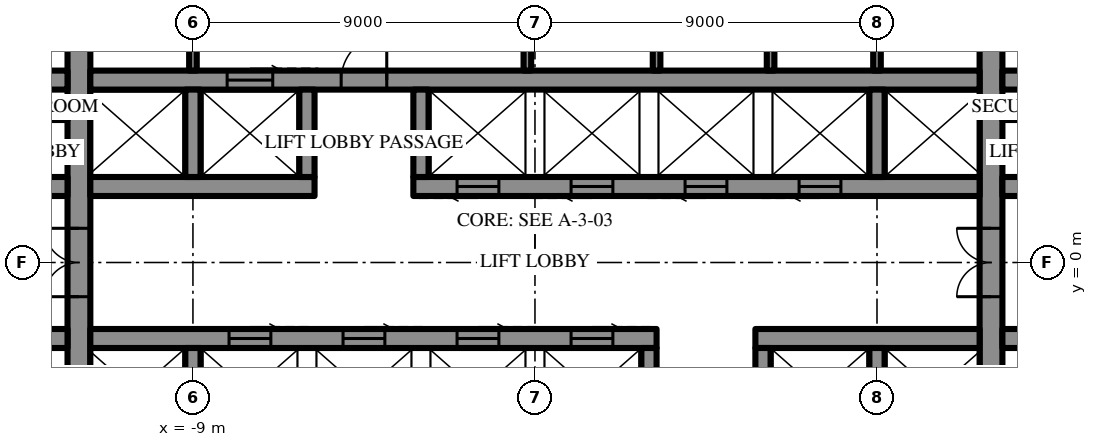
"""IFC4 building model, lengths in metres.
Left out: names, types, materials, properties, quantities, classifications, styles, units other than length and angle.
Written with IfcOpenShell. Run it as: python <this file> out.ifc"""

import sys

from ifc_helpers import new_model, si_unit, direction, frame, frame_2d, origin, place, context, subcontext, project, spatial, rectangle, extrude, element, fill, save


model = new_model("IFC4")
c1 = context("Model", 3, precision=1e-05, world=origin(), true_north=direction((0.0, 1.0)))
c2 = subcontext(c1, "Body", "Model", "MODEL_VIEW")
j1 = project(units=[si_unit("LENGTHUNIT", "METRE"), si_unit("PLANEANGLEUNIT", "RADIAN")], contexts=[c1])
p1 = place(None, origin())
s1 = spatial("IfcSite", under=j1, at=p1, CompositionType="ELEMENT")
p2 = place(p1, origin())
s2 = spatial("IfcBuilding", under=s1, at=p2, CompositionType="ELEMENT")
p3 = place(p2, frame((0.0, 0.0, 244.9)))
s3 = spatial("IfcBuildingStorey", under=s2, at=p3, CompositionType="ELEMENT", Elevation=244.9)
p4 = place(p3, frame((12.0, -10.7, 0.0), z_axis=(0.0, 0.0, 1.0), x_axis=(0.0, 1.0, 0.0)))
e1 = element("IfcWall", 1, at=p4, inside=s3, PredefinedType="SHEAR", context=c2, shape_type="SweptSolid", body=[
    extrude(rectangle(XDim=21.4, YDim=0.6, at=frame_2d((10.7, 0.0))), origin(), (0.0, 0.0, 1.0), 4.2),
])
p5 = place(p4, frame((9.8, 0.0, 0.0)))
e2 = element("IfcOpeningElement", 2, at=p5, cuts=e1, PredefinedType="OPENING", context=c2, shape_type="SweptSolid", body=[
    extrude(rectangle(XDim=1.8, YDim=2.4, at=frame_2d((0.9, 1.2))), frame((0.0, 0.31, 0.0), z_axis=(0.0, -1.0, 0.0), x_axis=(1.0, 0.0, 0.0)), (0.0, 0.0, 1.0), 0.62),
])
p6 = place(p3, frame((-12.0, -10.7, 0.0), z_axis=(0.0, 0.0, 1.0), x_axis=(0.0, 1.0, 0.0)))
e3 = element("IfcWall", 3, at=p6, inside=s3, PredefinedType="SHEAR", context=c2, shape_type="SweptSolid", body=[
    extrude(rectangle(XDim=21.4, YDim=0.6, at=frame_2d((10.7, 0.0))), origin(), (0.0, 0.0, 1.0), 4.2),
])
p7 = place(p6, frame((9.8, 0.0, 0.0)))
e4 = element("IfcOpeningElement", 4, at=p7, cuts=e3, PredefinedType="OPENING", context=c2, shape_type="SweptSolid", body=[
    extrude(rectangle(XDim=1.8, YDim=2.4, at=frame_2d((0.9, 1.2))), frame((0.0, 0.31, 0.0), z_axis=(0.0, -1.0, 0.0), x_axis=(1.0, 0.0, 0.0)), (0.0, 0.0, 1.0), 0.62),
])
p8 = place(p3, frame((-14.5, 2.0, 0.0), z_axis=(0.0, 0.0, 1.0), x_axis=(1.0, 0.0, 0.0)))
e5 = element("IfcWall", 5, at=p8, inside=s3, PredefinedType="SHEAR", context=c2, shape_type="SweptSolid", body=[
    extrude(rectangle(XDim=2.2, YDim=0.5, at=frame_2d((1.1, 0.0))), origin(), (0.0, 0.0, 1.0), 4.2),
])
p9 = place(p8, frame((0.5, 0.0, 0.0)))
e6 = element("IfcOpeningElement", 6, at=p9, cuts=e5, PredefinedType="OPENING", context=c2, shape_type="SweptSolid", body=[
    extrude(rectangle(XDim=0.9, YDim=2.2, at=frame_2d((0.45, 1.1))), frame((0.0, 0.26, 0.0), z_axis=(0.0, -1.0, 0.0), x_axis=(1.0, 0.0, 0.0)), (0.0, 0.0, 1.0), 0.52),
])
p10 = place(p3, frame((-11.7, 2.0, 0.0), z_axis=(0.0, 0.0, 1.0), x_axis=(1.0, 0.0, 0.0)))
e7 = element("IfcWall", 7, at=p10, inside=s3, PredefinedType="SHEAR", context=c2, shape_type="SweptSolid", body=[
    extrude(rectangle(XDim=5.9, YDim=0.5, at=frame_2d((2.95, 0.0))), origin(), (0.0, 0.0, 1.0), 4.2),
])
p11 = place(p3, frame((-3.2, 2.0, 0.0), z_axis=(0.0, 0.0, 1.0), x_axis=(1.0, 0.0, 0.0)))
e8 = element("IfcWall", 8, at=p11, inside=s3, PredefinedType="SHEAR", context=c2, shape_type="SweptSolid", body=[
    extrude(rectangle(XDim=14.9, YDim=0.5, at=frame_2d((7.45, 0.0))), origin(), (0.0, 0.0, 1.0), 4.2),
])
p12 = place(p11, frame((1.15, 0.0, 0.0)))
e9 = element("IfcOpeningElement", 9, at=p12, cuts=e8, PredefinedType="OPENING", context=c2, shape_type="SweptSolid", body=[
    extrude(rectangle(XDim=1.1, YDim=2.2, at=frame_2d((0.55, 1.1))), frame((0.0, 0.26, 0.0), z_axis=(0.0, -1.0, 0.0), x_axis=(1.0, 0.0, 0.0)), (0.0, 0.0, 1.0), 0.52),
])
p13 = place(p11, frame((4.15, 0.0, 0.0)))
e10 = element("IfcOpeningElement", 10, at=p13, cuts=e8, PredefinedType="OPENING", context=c2, shape_type="SweptSolid", body=[
    extrude(rectangle(XDim=1.1, YDim=2.2, at=frame_2d((0.55, 1.1))), frame((0.0, 0.26, 0.0), z_axis=(0.0, -1.0, 0.0), x_axis=(1.0, 0.0, 0.0)), (0.0, 0.0, 1.0), 0.52),
])
p14 = place(p11, frame((7.15, 0.0, 0.0)))
e11 = element("IfcOpeningElement", 11, at=p14, cuts=e8, PredefinedType="OPENING", context=c2, shape_type="SweptSolid", body=[
    extrude(rectangle(XDim=1.1, YDim=2.2, at=frame_2d((0.55, 1.1))), frame((0.0, 0.26, 0.0), z_axis=(0.0, -1.0, 0.0), x_axis=(1.0, 0.0, 0.0)), (0.0, 0.0, 1.0), 0.52),
])
p15 = place(p11, frame((10.15, 0.0, 0.0)))
e12 = element("IfcOpeningElement", 12, at=p15, cuts=e8, PredefinedType="OPENING", context=c2, shape_type="SweptSolid", body=[
    extrude(rectangle(XDim=1.1, YDim=2.2, at=frame_2d((0.55, 1.1))), frame((0.0, 0.26, 0.0), z_axis=(0.0, -1.0, 0.0), x_axis=(1.0, 0.0, 0.0)), (0.0, 0.0, 1.0), 0.52),
])
p16 = place(p3, frame((12.3, 2.0, 0.0), z_axis=(0.0, 0.0, 1.0), x_axis=(1.0, 0.0, 0.0)))
e13 = element("IfcWall", 13, at=p16, inside=s3, PredefinedType="SHEAR", context=c2, shape_type="SweptSolid", body=[
    extrude(rectangle(XDim=2.2, YDim=0.5, at=frame_2d((1.1, 0.0))), origin(), (0.0, 0.0, 1.0), 4.2),
])
p17 = place(p16, frame((0.8, 0.0, 0.0)))
e14 = element("IfcOpeningElement", 14, at=p17, cuts=e13, PredefinedType="OPENING", context=c2, shape_type="SweptSolid", body=[
    extrude(rectangle(XDim=0.9, YDim=2.2, at=frame_2d((0.45, 1.1))), frame((0.0, 0.26, 0.0), z_axis=(0.0, -1.0, 0.0), x_axis=(1.0, 0.0, 0.0)), (0.0, 0.0, 1.0), 0.52),
])
p18 = place(p3, frame((-14.5, 4.8, 0.0), z_axis=(0.0, 0.0, 1.0), x_axis=(1.0, 0.0, 0.0)))
e15 = element("IfcWall", 15, at=p18, inside=s3, PredefinedType="SHEAR", context=c2, shape_type="SweptSolid", body=[
    extrude(rectangle(XDim=2.2, YDim=0.5, at=frame_2d((1.1, 0.0))), origin(), (0.0, 0.0, 1.0), 4.2),
])
p19 = place(p3, frame((-11.7, 4.8, 0.0), z_axis=(0.0, 0.0, 1.0), x_axis=(1.0, 0.0, 0.0)))
e16 = element("IfcWall", 16, at=p19, inside=s3, PredefinedType="SHEAR", context=c2, shape_type="SweptSolid", body=[
    extrude(rectangle(XDim=23.4, YDim=0.5, at=frame_2d((11.7, 0.0))), origin(), (0.0, 0.0, 1.0), 4.2),
])
p20 = place(p19, frame((6.6, 0.0, 0.0)))
e17 = element("IfcOpeningElement", 17, at=p20, cuts=e16, PredefinedType="OPENING", context=c2, shape_type="SweptSolid", body=[
    extrude(rectangle(XDim=1.2, YDim=2.2, at=frame_2d((0.6, 1.1))), frame((0.0, 0.26, 0.0), z_axis=(0.0, -1.0, 0.0), x_axis=(1.0, 0.0, 0.0)), (0.0, 0.0, 1.0), 0.52),
])
p21 = place(p19, frame((3.6, 0.0, 0.0)))
e18 = element("IfcOpeningElement", 18, at=p21, cuts=e16, PredefinedType="OPENING", context=c2, shape_type="SweptSolid", body=[
    extrude(rectangle(XDim=1.2, YDim=2.2, at=frame_2d((0.6, 1.1))), frame((0.0, 0.26, 0.0), z_axis=(0.0, -1.0, 0.0), x_axis=(1.0, 0.0, 0.0)), (0.0, 0.0, 1.0), 0.52),
])
p22 = place(p3, frame((12.3, 4.8, 0.0), z_axis=(0.0, 0.0, 1.0), x_axis=(1.0, 0.0, 0.0)))
e19 = element("IfcWall", 19, at=p22, inside=s3, PredefinedType="SHEAR", context=c2, shape_type="SweptSolid", body=[
    extrude(rectangle(XDim=2.2, YDim=0.5, at=frame_2d((1.1, 0.0))), origin(), (0.0, 0.0, 1.0), 4.2),
])
for number, where, z_axis, x_axis in (
    (20, (-9.0, 2.25, 0.0), (0.0, 0.0, 1.0), (0.0, 1.0, 0.0)),
    (21, (-6.0, 2.25, 0.0), (0.0, 0.0, 1.0), (0.0, 1.0, 0.0)),
    (22, (-3.0, 2.25, 0.0), (0.0, 0.0, 1.0), (0.0, 1.0, 0.0)),
    (23, (9.0, 2.25, 0.0), (0.0, 0.0, 1.0), (0.0, 1.0, 0.0)),
):
    element("IfcWall", number, at=place(p3, frame(where, z_axis=z_axis, x_axis=x_axis)), inside=s3, PredefinedType="SHEAR", context=c2, shape_type="SweptSolid", body=[
        extrude(rectangle(XDim=2.3, YDim=0.4, at=frame_2d((1.15, 0.0))), origin(), (0.0, 0.0, 1.0), 4.2),
    ])
p23 = place(p3, frame((-0.2, 5.05, 0.0), z_axis=(0.0, 0.0, 1.0), x_axis=(0.0, 1.0, 0.0)))
e24 = element("IfcWall", 24, at=p23, inside=s3, PredefinedType="SHEAR", context=c2, shape_type="SweptSolid", body=[
    extrude(rectangle(XDim=5.65, YDim=0.2, at=frame_2d((2.825, 0.0))), origin(), (0.0, 0.0, 1.0), 4.2),
])
p24 = place(p3, frame((14.5, -2.0, 0.0), z_axis=(0.0, 0.0, 1.0), x_axis=(-1.0, 0.0, 0.0)))
e25 = element("IfcWall", 25, at=p24, inside=s3, PredefinedType="SHEAR", context=c2, shape_type="SweptSolid", body=[
    extrude(rectangle(XDim=2.2, YDim=0.5, at=frame_2d((1.1, 0.0))), origin(), (0.0, 0.0, 1.0), 4.2),
])
p25 = place(p24, frame((0.5, 0.0, 0.0)))
e26 = element("IfcOpeningElement", 26, at=p25, cuts=e25, PredefinedType="OPENING", context=c2, shape_type="SweptSolid", body=[
    extrude(rectangle(XDim=0.9, YDim=2.2, at=frame_2d((0.45, 1.1))), frame((0.0, 0.26, 0.0), z_axis=(0.0, -1.0, 0.0), x_axis=(1.0, 0.0, 0.0)), (0.0, 0.0, 1.0), 0.52),
])
p26 = place(p3, frame((11.7, -2.0, 0.0), z_axis=(0.0, 0.0, 1.0), x_axis=(-1.0, 0.0, 0.0)))
e27 = element("IfcWall", 27, at=p26, inside=s3, PredefinedType="SHEAR", context=c2, shape_type="SweptSolid", body=[
    extrude(rectangle(XDim=5.9, YDim=0.5, at=frame_2d((2.95, 0.0))), origin(), (0.0, 0.0, 1.0), 4.2),
])
p27 = place(p3, frame((3.2, -2.0, 0.0), z_axis=(0.0, 0.0, 1.0), x_axis=(-1.0, 0.0, 0.0)))
e28 = element("IfcWall", 28, at=p27, inside=s3, PredefinedType="SHEAR", context=c2, shape_type="SweptSolid", body=[
    extrude(rectangle(XDim=14.9, YDim=0.5, at=frame_2d((7.45, 0.0))), origin(), (0.0, 0.0, 1.0), 4.2),
])
p28 = place(p27, frame((1.15, 0.0, 0.0)))
e29 = element("IfcOpeningElement", 29, at=p28, cuts=e28, PredefinedType="OPENING", context=c2, shape_type="SweptSolid", body=[
    extrude(rectangle(XDim=1.1, YDim=2.2, at=frame_2d((0.55, 1.1))), frame((0.0, 0.26, 0.0), z_axis=(0.0, -1.0, 0.0), x_axis=(1.0, 0.0, 0.0)), (0.0, 0.0, 1.0), 0.52),
])
p29 = place(p27, frame((4.15, 0.0, 0.0)))
e30 = element("IfcOpeningElement", 30, at=p29, cuts=e28, PredefinedType="OPENING", context=c2, shape_type="SweptSolid", body=[
    extrude(rectangle(XDim=1.1, YDim=2.2, at=frame_2d((0.55, 1.1))), frame((0.0, 0.26, 0.0), z_axis=(0.0, -1.0, 0.0), x_axis=(1.0, 0.0, 0.0)), (0.0, 0.0, 1.0), 0.52),
])
p30 = place(p27, frame((7.15, 0.0, 0.0)))
e31 = element("IfcOpeningElement", 31, at=p30, cuts=e28, PredefinedType="OPENING", context=c2, shape_type="SweptSolid", body=[
    extrude(rectangle(XDim=1.1, YDim=2.2, at=frame_2d((0.55, 1.1))), frame((0.0, 0.26, 0.0), z_axis=(0.0, -1.0, 0.0), x_axis=(1.0, 0.0, 0.0)), (0.0, 0.0, 1.0), 0.52),
])
p31 = place(p27, frame((10.15, 0.0, 0.0)))
e32 = element("IfcOpeningElement", 32, at=p31, cuts=e28, PredefinedType="OPENING", context=c2, shape_type="SweptSolid", body=[
    extrude(rectangle(XDim=1.1, YDim=2.2, at=frame_2d((0.55, 1.1))), frame((0.0, 0.26, 0.0), z_axis=(0.0, -1.0, 0.0), x_axis=(1.0, 0.0, 0.0)), (0.0, 0.0, 1.0), 0.52),
])
p32 = place(p3, frame((-12.3, -2.0, 0.0), z_axis=(0.0, 0.0, 1.0), x_axis=(-1.0, 0.0, 0.0)))
e33 = element("IfcWall", 33, at=p32, inside=s3, PredefinedType="SHEAR", context=c2, shape_type="SweptSolid", body=[
    extrude(rectangle(XDim=2.2, YDim=0.5, at=frame_2d((1.1, 0.0))), origin(), (0.0, 0.0, 1.0), 4.2),
])
p33 = place(p32, frame((0.8, 0.0, 0.0)))
e34 = element("IfcOpeningElement", 34, at=p33, cuts=e33, PredefinedType="OPENING", context=c2, shape_type="SweptSolid", body=[
    extrude(rectangle(XDim=0.9, YDim=2.2, at=frame_2d((0.45, 1.1))), frame((0.0, 0.26, 0.0), z_axis=(0.0, -1.0, 0.0), x_axis=(1.0, 0.0, 0.0)), (0.0, 0.0, 1.0), 0.52),
])
for number, where, z_axis, x_axis in (
    (35, (9.0, -2.25, 0.0), (0.0, 0.0, 1.0), (0.0, -1.0, 0.0)),
    (36, (6.0, -2.25, 0.0), (0.0, 0.0, 1.0), (0.0, -1.0, 0.0)),
    (37, (3.0, -2.25, 0.0), (0.0, 0.0, 1.0), (0.0, -1.0, 0.0)),
    (38, (-9.0, -2.25, 0.0), (0.0, 0.0, 1.0), (0.0, -1.0, 0.0)),
):
    element("IfcWall", number, at=place(p3, frame(where, z_axis=z_axis, x_axis=x_axis)), inside=s3, PredefinedType="SHEAR", context=c2, shape_type="SweptSolid", body=[
        extrude(rectangle(XDim=2.3, YDim=0.4, at=frame_2d((1.15, 0.0))), origin(), (0.0, 0.0, 1.0), 4.2),
    ])
for number, where, z_axis, x_axis in (
    (39, (-9.0, 5.05, 0.0), (0.0, 0.0, 1.0), (0.0, 1.0, 0.0)),
    (40, (9.0, 5.05, 0.0), (0.0, 0.0, 1.0), (0.0, 1.0, 0.0)),
    (41, (3.2, 5.05, 0.0), (0.0, 0.0, 1.0), (0.0, 1.0, 0.0)),
    (42, (6.2, 5.05, 0.0), (0.0, 0.0, 1.0), (0.0, 1.0, 0.0)),
):
    element("IfcWall", number, at=place(p3, frame(where, z_axis=z_axis, x_axis=x_axis)), inside=s3, PredefinedType="PARTITIONING", context=c2, shape_type="SweptSolid", body=[
        extrude(rectangle(XDim=5.65, YDim=0.2, at=frame_2d((2.825, 0.0))), origin(), (0.0, 0.0, 1.0), 4.0),
    ])
for number, where, z_axis, x_axis in (
    (43, (-14.8, 3.85, 0.0), (0.0, 0.0, 1.0), (1.0, 0.0, 0.0)),
    (44, (12.3, 3.85, 0.0), (0.0, 0.0, 1.0), (1.0, 0.0, 0.0)),
):
    element("IfcWall", number, at=place(p3, frame(where, z_axis=z_axis, x_axis=x_axis)), inside=s3, PredefinedType="PARTITIONING", context=c2, shape_type="SweptSolid", body=[
        extrude(rectangle(XDim=2.5, YDim=0.2, at=frame_2d((1.25, 0.0))), origin(), (0.0, 0.0, 1.0), 4.0),
    ])
p34 = place(p20, origin())
e45 = element("IfcDoor", 45, at=p34, inside=s3, OperationType="SINGLE_SWING_LEFT", PredefinedType="DOOR", context=c2, shape_type="SweptSolid", body=[
    extrude(rectangle(XDim=1.2, YDim=2.2, at=frame_2d((0.6, 1.1))), frame((0.0, 0.025, 0.0), z_axis=(0.0, -1.0, 0.0), x_axis=(1.0, 0.0, 0.0)), (0.0, 0.0, 1.0), 0.05),
])
fill(e17, e45)
p35 = place(p5, origin())
e46 = element("IfcDoor", 46, at=p35, inside=s3, OperationType="DOUBLE_DOOR_SINGLE_SWING", PredefinedType="DOOR", context=c2, shape_type="SweptSolid", body=[
    extrude(rectangle(XDim=1.8, YDim=2.4, at=frame_2d((0.9, 1.2))), frame((0.0, 0.025, 0.0), z_axis=(0.0, -1.0, 0.0), x_axis=(1.0, 0.0, 0.0)), (0.0, 0.0, 1.0), 0.05),
])
fill(e2, e46)
p36 = place(p7, origin())
e47 = element("IfcDoor", 47, at=p36, inside=s3, OperationType="DOUBLE_DOOR_SINGLE_SWING", PredefinedType="DOOR", context=c2, shape_type="SweptSolid", body=[
    extrude(rectangle(XDim=1.8, YDim=2.4, at=frame_2d((0.9, 1.2))), frame((0.0, 0.025, 0.0), z_axis=(0.0, -1.0, 0.0), x_axis=(1.0, 0.0, 0.0)), (0.0, 0.0, 1.0), 0.05),
])
fill(e4, e47)
p37 = place(p21, origin())
e48 = element("IfcDoor", 48, at=p37, inside=s3, OperationType="SLIDING_TO_LEFT", PredefinedType="DOOR", context=c2, shape_type="SweptSolid", body=[
    extrude(rectangle(XDim=1.2, YDim=2.2, at=frame_2d((0.6, 1.1))), frame((0.0, 0.025, 0.0), z_axis=(0.0, -1.0, 0.0), x_axis=(1.0, 0.0, 0.0)), (0.0, 0.0, 1.0), 0.05),
])
fill(e18, e48)
p38 = place(p12, frame((1.1, 0.0, 0.0), z_axis=(0.0, 0.0, 1.0), x_axis=(-1.0, 0.0, 0.0)))
e49 = element("IfcDoor", 49, at=p38, inside=s3, OperationType="SLIDING_TO_LEFT", PredefinedType="DOOR", context=c2, shape_type="SweptSolid", body=[
    extrude(rectangle(XDim=1.1, YDim=2.2, at=frame_2d((0.55, 1.1))), frame((0.0, 0.025, 0.0), z_axis=(0.0, -1.0, 0.0), x_axis=(1.0, 0.0, 0.0)), (0.0, 0.0, 1.0), 0.05),
])
fill(e9, e49)
p39 = place(p13, frame((1.1, 0.0, 0.0), z_axis=(0.0, 0.0, 1.0), x_axis=(-1.0, 0.0, 0.0)))
e50 = element("IfcDoor", 50, at=p39, inside=s3, OperationType="SLIDING_TO_LEFT", PredefinedType="DOOR", context=c2, shape_type="SweptSolid", body=[
    extrude(rectangle(XDim=1.1, YDim=2.2, at=frame_2d((0.55, 1.1))), frame((0.0, 0.025, 0.0), z_axis=(0.0, -1.0, 0.0), x_axis=(1.0, 0.0, 0.0)), (0.0, 0.0, 1.0), 0.05),
])
fill(e10, e50)
p40 = place(p14, frame((1.1, 0.0, 0.0), z_axis=(0.0, 0.0, 1.0), x_axis=(-1.0, 0.0, 0.0)))
e51 = element("IfcDoor", 51, at=p40, inside=s3, OperationType="SLIDING_TO_LEFT", PredefinedType="DOOR", context=c2, shape_type="SweptSolid", body=[
    extrude(rectangle(XDim=1.1, YDim=2.2, at=frame_2d((0.55, 1.1))), frame((0.0, 0.025, 0.0), z_axis=(0.0, -1.0, 0.0), x_axis=(1.0, 0.0, 0.0)), (0.0, 0.0, 1.0), 0.05),
])
fill(e11, e51)
p41 = place(p15, frame((1.1, 0.0, 0.0), z_axis=(0.0, 0.0, 1.0), x_axis=(-1.0, 0.0, 0.0)))
e52 = element("IfcDoor", 52, at=p41, inside=s3, OperationType="SLIDING_TO_LEFT", PredefinedType="DOOR", context=c2, shape_type="SweptSolid", body=[
    extrude(rectangle(XDim=1.1, YDim=2.2, at=frame_2d((0.55, 1.1))), frame((0.0, 0.025, 0.0), z_axis=(0.0, -1.0, 0.0), x_axis=(1.0, 0.0, 0.0)), (0.0, 0.0, 1.0), 0.05),
])
fill(e12, e52)
p42 = place(p28, frame((1.1, 0.0, 0.0), z_axis=(0.0, 0.0, 1.0), x_axis=(-1.0, 0.0, 0.0)))
e53 = element("IfcDoor", 53, at=p42, inside=s3, OperationType="SLIDING_TO_LEFT", PredefinedType="DOOR", context=c2, shape_type="SweptSolid", body=[
    extrude(rectangle(XDim=1.1, YDim=2.2, at=frame_2d((0.55, 1.1))), frame((0.0, 0.025, 0.0), z_axis=(0.0, -1.0, 0.0), x_axis=(1.0, 0.0, 0.0)), (0.0, 0.0, 1.0), 0.05),
])
fill(e29, e53)
p43 = place(p29, frame((1.1, 0.0, 0.0), z_axis=(0.0, 0.0, 1.0), x_axis=(-1.0, 0.0, 0.0)))
e54 = element("IfcDoor", 54, at=p43, inside=s3, OperationType="SLIDING_TO_LEFT", PredefinedType="DOOR", context=c2, shape_type="SweptSolid", body=[
    extrude(rectangle(XDim=1.1, YDim=2.2, at=frame_2d((0.55, 1.1))), frame((0.0, 0.025, 0.0), z_axis=(0.0, -1.0, 0.0), x_axis=(1.0, 0.0, 0.0)), (0.0, 0.0, 1.0), 0.05),
])
fill(e30, e54)
p44 = place(p30, frame((1.1, 0.0, 0.0), z_axis=(0.0, 0.0, 1.0), x_axis=(-1.0, 0.0, 0.0)))
e55 = element("IfcDoor", 55, at=p44, inside=s3, OperationType="SLIDING_TO_LEFT", PredefinedType="DOOR", context=c2, shape_type="SweptSolid", body=[
    extrude(rectangle(XDim=1.1, YDim=2.2, at=frame_2d((0.55, 1.1))), frame((0.0, 0.025, 0.0), z_axis=(0.0, -1.0, 0.0), x_axis=(1.0, 0.0, 0.0)), (0.0, 0.0, 1.0), 0.05),
])
fill(e31, e55)
p45 = place(p31, frame((1.1, 0.0, 0.0), z_axis=(0.0, 0.0, 1.0), x_axis=(-1.0, 0.0, 0.0)))
e56 = element("IfcDoor", 56, at=p45, inside=s3, OperationType="SLIDING_TO_LEFT", PredefinedType="DOOR", context=c2, shape_type="SweptSolid", body=[
    extrude(rectangle(XDim=1.1, YDim=2.2, at=frame_2d((0.55, 1.1))), frame((0.0, 0.025, 0.0), z_axis=(0.0, -1.0, 0.0), x_axis=(1.0, 0.0, 0.0)), (0.0, 0.0, 1.0), 0.05),
])
fill(e32, e56)
save(model, sys.argv[1])
